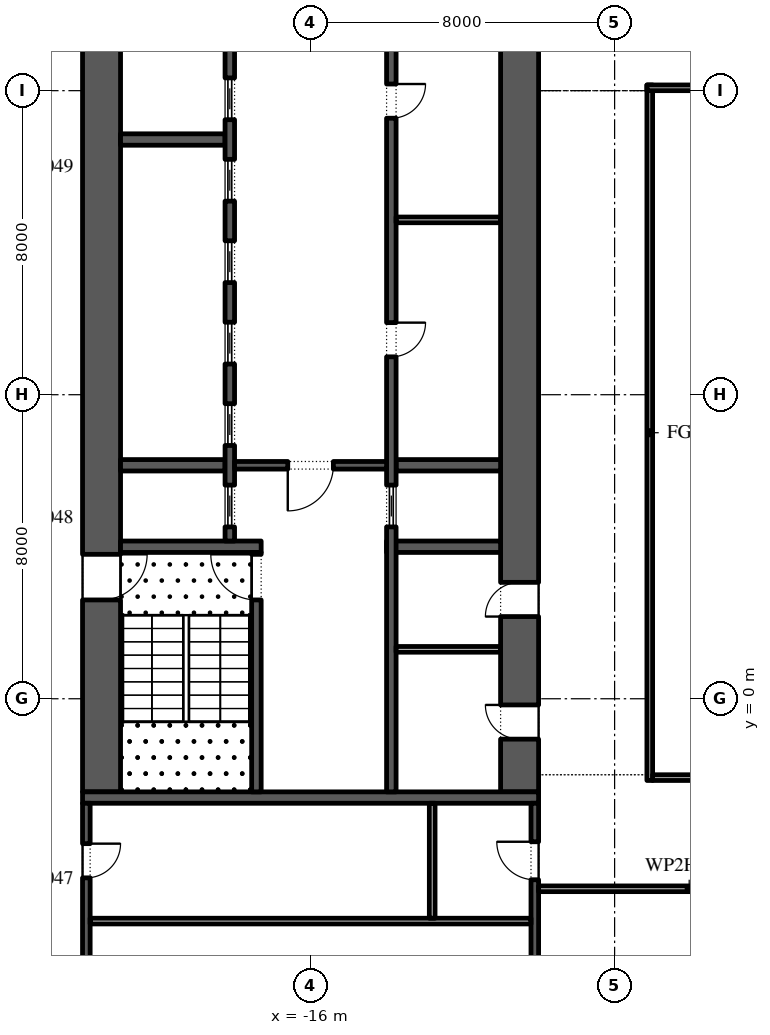
"""IFC4 building model, lengths in metres.
Left out: names, types, materials, properties, quantities, classifications, styles, units other than length and angle.
Written with IfcOpenShell. Run it as: python <this file> out.ifc"""

import sys

from ifc_helpers import new_model, si_unit, direction, frame, frame_2d, origin, place, context, subcontext, project, spatial, rectangle, extrude, element, fill, save


model = new_model("IFC4")
c1 = context("Model", 3, precision=1e-05, world=origin(), true_north=direction((0.0, 1.0)))
c2 = subcontext(c1, "Body", "Model", "MODEL_VIEW")
j1 = project(units=[si_unit("LENGTHUNIT", "METRE"), si_unit("PLANEANGLEUNIT", "RADIAN")], contexts=[c1])
p1 = place(None, origin())
s1 = spatial("IfcSite", under=j1, at=p1, CompositionType="ELEMENT")
p2 = place(p1, origin())
s2 = spatial("IfcBuilding", under=s1, at=p2, CompositionType="ELEMENT")
p3 = place(p2, frame((0.0, 0.0, 8.0)))
s3 = spatial("IfcBuildingStorey", under=s2, at=p3, CompositionType="ELEMENT", Elevation=8.0)
p4 = place(p3, frame((-7.075, -2.15, 0.0), z_axis=(0.0, 0.0, 1.0), x_axis=(0.0, 1.0, 0.0)))
e1 = element("IfcWall", 1, at=p4, inside=s3, PredefinedType="STANDARD", context=c2, shape_type="SweptSolid", body=[
    extrude(rectangle(XDim=18.3, YDim=0.15, at=frame_2d((9.15, 0.0))), origin(), (0.0, 0.0, 1.0), 5.7),
])
for number, where, z_axis, x_axis in (
    (2, (-7.15, 16.075, 0.0), (0.0, 0.0, 1.0), (1.0, 0.0, 0.0)),
    (3, (7.15, -2.075, 0.0), (0.0, 0.0, 1.0), (-1.0, 0.0, 0.0)),
):
    element("IfcWall", number, at=place(p3, frame(where, z_axis=z_axis, x_axis=x_axis)), inside=s3, PredefinedType="STANDARD", context=c2, shape_type="SweptSolid", body=[
        extrude(rectangle(XDim=14.15, YDim=0.15, at=frame_2d((7.075, 0.0))), origin(), (0.0, 0.0, 1.0), 4.72),
    ])
p5 = place(p3, frame((-21.5, -2.45, 0.0), z_axis=(0.0, 0.0, 1.0), x_axis=(0.0, 1.0, 0.0)))
e4 = element("IfcWall", 4, at=p5, inside=s3, PredefinedType="SHEAR", context=c2, shape_type="SweptSolid", body=[
    extrude(rectangle(XDim=27.9, YDim=1.0, at=frame_2d((13.95, 0.0))), origin(), (0.0, 0.0, 1.0), 5.7),
])
p6 = place(p5, frame((5.05, 0.0, 0.0)))
e5 = element("IfcOpeningElement", 5, at=p6, cuts=e4, PredefinedType="OPENING", context=c2, shape_type="SweptSolid", body=[
    extrude(rectangle(XDim=1.2, YDim=2.1, at=frame_2d((0.6, 1.05))), frame((0.0, 0.51, 0.0), z_axis=(0.0, -1.0, 0.0), x_axis=(1.0, 0.0, 0.0)), (0.0, 0.0, 1.0), 1.02),
])
p7 = place(p5, frame((21.65, 0.0, 0.0)))
e6 = element("IfcOpeningElement", 6, at=p7, cuts=e4, PredefinedType="OPENING", context=c2, shape_type="SweptSolid", body=[
    extrude(rectangle(XDim=1.2, YDim=2.1, at=frame_2d((0.6, 1.05))), frame((0.0, 0.51, 0.0), z_axis=(0.0, -1.0, 0.0), x_axis=(1.0, 0.0, 0.0)), (0.0, 0.0, 1.0), 1.02),
])
p8 = place(p3, frame((-10.5, -2.45, 0.0), z_axis=(0.0, 0.0, 1.0), x_axis=(0.0, 1.0, 0.0)))
e7 = element("IfcWall", 7, at=p8, inside=s3, PredefinedType="SHEAR", context=c2, shape_type="SweptSolid", body=[
    extrude(rectangle(XDim=27.9, YDim=1.0, at=frame_2d((13.95, 0.0))), origin(), (0.0, 0.0, 1.0), 5.7),
])
p9 = place(p8, frame((23.65, 0.0, 0.0)))
e8 = element("IfcOpeningElement", 8, at=p9, cuts=e7, PredefinedType="OPENING", context=c2, shape_type="SweptSolid", body=[
    extrude(rectangle(XDim=2.4, YDim=2.1, at=frame_2d((1.2, 1.05))), frame((0.0, 0.51, 0.0), z_axis=(0.0, -1.0, 0.0), x_axis=(1.0, 0.0, 0.0)), (0.0, 0.0, 1.0), 1.02),
])
p10 = place(p8, frame((1.387, 0.0, 0.0)))
e9 = element("IfcOpeningElement", 9, at=p10, cuts=e7, PredefinedType="OPENING", context=c2, shape_type="SweptSolid", body=[
    extrude(rectangle(XDim=0.9, YDim=2.1, at=frame_2d((0.45, 1.05))), frame((0.0, 0.51, 0.0), z_axis=(0.0, -1.0, 0.0), x_axis=(1.0, 0.0, 0.0)), (0.0, 0.0, 1.0), 1.02),
])
p11 = place(p8, frame((4.613, 0.0, 0.0)))
e10 = element("IfcOpeningElement", 10, at=p11, cuts=e7, PredefinedType="OPENING", context=c2, shape_type="SweptSolid", body=[
    extrude(rectangle(XDim=0.9, YDim=2.1, at=frame_2d((0.45, 1.05))), frame((0.0, 0.51, 0.0), z_axis=(0.0, -1.0, 0.0), x_axis=(1.0, 0.0, 0.0)), (0.0, 0.0, 1.0), 1.02),
])
p12 = place(p3, frame((-22.0, -2.6, 0.0), z_axis=(0.0, 0.0, 1.0), x_axis=(1.0, 0.0, 0.0)))
e11 = element("IfcWall", 11, at=p12, inside=s3, PredefinedType="SHEAR", context=c2, shape_type="SweptSolid", body=[
    extrude(rectangle(XDim=12.0, YDim=0.3, at=frame_2d((6.0, 0.0))), origin(), (0.0, 0.0, 1.0), 5.7),
])
p13 = place(p3, frame((-21.0, 4.0, 0.0), z_axis=(0.0, 0.0, 1.0), x_axis=(1.0, 0.0, 0.0)))
e12 = element("IfcWall", 12, at=p13, inside=s3, PredefinedType="SHEAR", context=c2, shape_type="SweptSolid", body=[
    extrude(rectangle(XDim=3.7, YDim=0.3, at=frame_2d((1.85, 0.0))), origin(), (0.0, 0.0, 1.0), 5.7),
])
p14 = place(p3, frame((-17.425, -2.45, 0.0), z_axis=(0.0, 0.0, 1.0), x_axis=(0.0, 1.0, 0.0)))
e13 = element("IfcWall", 13, at=p14, inside=s3, PredefinedType="SHEAR", context=c2, shape_type="SweptSolid", body=[
    extrude(rectangle(XDim=6.3, YDim=0.25, at=frame_2d((3.15, 0.0))), origin(), (0.0, 0.0, 1.0), 5.7),
])
p15 = place(p14, frame((5.05, 0.0, 0.0)))
e14 = element("IfcOpeningElement", 14, at=p15, cuts=e13, PredefinedType="OPENING", context=c2, shape_type="SweptSolid", body=[
    extrude(rectangle(XDim=1.2, YDim=2.1, at=frame_2d((0.6, 1.05))), frame((0.0, 0.135, 0.0), z_axis=(0.0, -1.0, 0.0), x_axis=(1.0, 0.0, 0.0)), (0.0, 0.0, 1.0), 0.27),
])
for number, where, z_axis, x_axis in (
    (15, (-21.0, 6.143, 0.0), (0.0, 0.0, 1.0), (1.0, 0.0, 0.0)),
    (16, (-21.0, 14.714, 0.0), (0.0, 0.0, 1.0), (1.0, 0.0, 0.0)),
):
    element("IfcWall", number, at=place(p3, frame(where, z_axis=z_axis, x_axis=x_axis)), inside=s3, PredefinedType="SHEAR", context=c2, shape_type="SweptSolid", body=[
        extrude(rectangle(XDim=2.75, YDim=0.3, at=frame_2d((1.375, 0.0))), origin(), (0.0, 0.0, 1.0), 5.7),
    ])
p16 = place(p3, frame((-18.125, 4.15, 0.0), z_axis=(0.0, 0.0, 1.0), x_axis=(0.0, 1.0, 0.0)))
e17 = element("IfcWall", 17, at=p16, inside=s3, PredefinedType="SHEAR", context=c2, shape_type="SweptSolid", body=[
    extrude(rectangle(XDim=14.7, YDim=0.25, at=frame_2d((7.35, 0.0))), origin(), (0.0, 0.0, 1.0), 5.7),
])
p17 = place(p16, frame((0.371, 0.0, 0.0)))
e18 = element("IfcOpeningElement", 18, at=p17, cuts=e17, PredefinedType="OPENING", context=c2, shape_type="SweptSolid", body=[
    extrude(rectangle(XDim=1.1, YDim=2.1, at=frame_2d((0.55, 1.05))), frame((0.0, 0.135, 0.0), z_axis=(0.0, -1.0, 0.0), x_axis=(1.0, 0.0, 0.0)), (0.0, 0.0, 1.0), 0.27),
])
p18 = place(p16, frame((2.514, 0.0, 0.0)))
e19 = element("IfcOpeningElement", 19, at=p18, cuts=e17, PredefinedType="OPENING", context=c2, shape_type="SweptSolid", body=[
    extrude(rectangle(XDim=1.1, YDim=2.1, at=frame_2d((0.55, 1.05))), frame((0.0, 0.135, 0.0), z_axis=(0.0, -1.0, 0.0), x_axis=(1.0, 0.0, 0.0)), (0.0, 0.0, 1.0), 0.27),
])
p19 = place(p16, frame((4.657, 0.0, 0.0)))
e20 = element("IfcOpeningElement", 20, at=p19, cuts=e17, PredefinedType="OPENING", context=c2, shape_type="SweptSolid", body=[
    extrude(rectangle(XDim=1.1, YDim=2.1, at=frame_2d((0.55, 1.05))), frame((0.0, 0.135, 0.0), z_axis=(0.0, -1.0, 0.0), x_axis=(1.0, 0.0, 0.0)), (0.0, 0.0, 1.0), 0.27),
])
p20 = place(p16, frame((6.8, 0.0, 0.0)))
e21 = element("IfcOpeningElement", 21, at=p20, cuts=e17, PredefinedType="OPENING", context=c2, shape_type="SweptSolid", body=[
    extrude(rectangle(XDim=1.1, YDim=2.1, at=frame_2d((0.55, 1.05))), frame((0.0, 0.135, 0.0), z_axis=(0.0, -1.0, 0.0), x_axis=(1.0, 0.0, 0.0)), (0.0, 0.0, 1.0), 0.27),
])
p21 = place(p16, frame((8.943, 0.0, 0.0)))
e22 = element("IfcOpeningElement", 22, at=p21, cuts=e17, PredefinedType="OPENING", context=c2, shape_type="SweptSolid", body=[
    extrude(rectangle(XDim=1.1, YDim=2.1, at=frame_2d((0.55, 1.05))), frame((0.0, 0.135, 0.0), z_axis=(0.0, -1.0, 0.0), x_axis=(1.0, 0.0, 0.0)), (0.0, 0.0, 1.0), 0.27),
])
p22 = place(p16, frame((11.086, 0.0, 0.0)))
e23 = element("IfcOpeningElement", 23, at=p22, cuts=e17, PredefinedType="OPENING", context=c2, shape_type="SweptSolid", body=[
    extrude(rectangle(XDim=1.1, YDim=2.1, at=frame_2d((0.55, 1.05))), frame((0.0, 0.135, 0.0), z_axis=(0.0, -1.0, 0.0), x_axis=(1.0, 0.0, 0.0)), (0.0, 0.0, 1.0), 0.27),
])
p23 = place(p16, frame((13.229, 0.0, 0.0)))
e24 = element("IfcOpeningElement", 24, at=p23, cuts=e17, PredefinedType="OPENING", context=c2, shape_type="SweptSolid", body=[
    extrude(rectangle(XDim=1.1, YDim=2.1, at=frame_2d((0.55, 1.05))), frame((0.0, 0.135, 0.0), z_axis=(0.0, -1.0, 0.0), x_axis=(1.0, 0.0, 0.0)), (0.0, 0.0, 1.0), 0.27),
])
p24 = place(p3, frame((-14.0, 4.0, 0.0), z_axis=(0.0, 0.0, 1.0), x_axis=(1.0, 0.0, 0.0)))
e25 = element("IfcWall", 25, at=p24, inside=s3, PredefinedType="SHEAR", context=c2, shape_type="SweptSolid", body=[
    extrude(rectangle(XDim=3.0, YDim=0.3, at=frame_2d((1.5, 0.0))), origin(), (0.0, 0.0, 1.0), 5.7),
])
p25 = place(p3, frame((-13.75, 6.143, 0.0), z_axis=(0.0, 0.0, 1.0), x_axis=(1.0, 0.0, 0.0)))
e26 = element("IfcWall", 26, at=p25, inside=s3, PredefinedType="SHEAR", context=c2, shape_type="SweptSolid", body=[
    extrude(rectangle(XDim=2.75, YDim=0.3, at=frame_2d((1.375, 0.0))), origin(), (0.0, 0.0, 1.0), 5.7),
])
p26 = place(p3, frame((-13.875, -2.45, 0.0), z_axis=(0.0, 0.0, 1.0), x_axis=(0.0, 1.0, 0.0)))
e27 = element("IfcWall", 27, at=p26, inside=s3, PredefinedType="SHEAR", context=c2, shape_type="SweptSolid", body=[
    extrude(rectangle(XDim=21.3, YDim=0.25, at=frame_2d((10.65, 0.0))), origin(), (0.0, 0.0, 1.0), 5.7),
])
p27 = place(p26, frame((11.446, 0.0, 0.0)))
e28 = element("IfcOpeningElement", 28, at=p27, cuts=e27, PredefinedType="OPENING", context=c2, shape_type="SweptSolid", body=[
    extrude(rectangle(XDim=0.9, YDim=2.1, at=frame_2d((0.45, 1.05))), frame((0.0, 0.135, 0.0), z_axis=(0.0, -1.0, 0.0), x_axis=(1.0, 0.0, 0.0)), (0.0, 0.0, 1.0), 0.27),
])
p28 = place(p26, frame((17.725, 0.0, 0.0)))
e29 = element("IfcOpeningElement", 29, at=p28, cuts=e27, PredefinedType="OPENING", context=c2, shape_type="SweptSolid", body=[
    extrude(rectangle(XDim=0.9, YDim=2.1, at=frame_2d((0.45, 1.05))), frame((0.0, 0.135, 0.0), z_axis=(0.0, -1.0, 0.0), x_axis=(1.0, 0.0, 0.0)), (0.0, 0.0, 1.0), 0.27),
])
p29 = place(p26, frame((6.971, 0.0, 0.0)))
e30 = element("IfcOpeningElement", 30, at=p29, cuts=e27, PredefinedType="OPENING", context=c2, shape_type="SweptSolid", body=[
    extrude(rectangle(XDim=1.1, YDim=2.1, at=frame_2d((0.55, 1.05))), frame((0.0, 0.135, 0.0), z_axis=(0.0, -1.0, 0.0), x_axis=(1.0, 0.0, 0.0)), (0.0, 0.0, 1.0), 0.27),
])
p30 = place(p3, frame((-13.75, 12.6, 0.0), z_axis=(0.0, 0.0, 1.0), x_axis=(1.0, 0.0, 0.0)))
e31 = element("IfcWall", 31, at=p30, inside=s3, PredefinedType="PARTITIONING", context=c2, shape_type="SweptSolid", body=[
    extrude(rectangle(XDim=2.75, YDim=0.15, at=frame_2d((1.375, 0.0))), origin(), (0.0, 0.0, 1.0), 5.7),
])
p31 = place(p3, frame((-18.0, 6.143, 0.0), z_axis=(0.0, 0.0, 1.0), x_axis=(1.0, 0.0, 0.0)))
e32 = element("IfcWall", 32, at=p31, inside=s3, PredefinedType="SHEAR", context=c2, shape_type="SweptSolid", body=[
    extrude(rectangle(XDim=4.0, YDim=0.2, at=frame_2d((2.0, 0.0))), origin(), (0.0, 0.0, 1.0), 5.7),
])
p32 = place(p31, frame((1.4, 0.0, 0.0)))
e33 = element("IfcOpeningElement", 33, at=p32, cuts=e32, PredefinedType="OPENING", context=c2, shape_type="SweptSolid", body=[
    extrude(rectangle(XDim=1.2, YDim=2.1, at=frame_2d((0.6, 1.05))), frame((0.0, 0.11, 0.0), z_axis=(0.0, -1.0, 0.0), x_axis=(1.0, 0.0, 0.0)), (0.0, 0.0, 1.0), 0.22),
])
p33 = place(p3, frame((-13.75, 1.3, 0.0), z_axis=(0.0, 0.0, 1.0), x_axis=(1.0, 0.0, 0.0)))
e34 = element("IfcWall", 34, at=p33, inside=s3, PredefinedType="PARTITIONING", context=c2, shape_type="SweptSolid", body=[
    extrude(rectangle(XDim=2.75, YDim=0.15, at=frame_2d((1.375, 0.0))), origin(), (0.0, 0.0, 1.0), 5.7),
])
p34 = place(p3, frame((-21.9, -15.8, 0.0), z_axis=(0.0, 0.0, 1.0), x_axis=(0.0, 1.0, 0.0)))
e35 = element("IfcWall", 35, at=p34, inside=s3, PredefinedType="SHEAR", context=c2, shape_type="SweptSolid", body=[
    extrude(rectangle(XDim=13.05, YDim=0.2, at=frame_2d((6.525, 0.0))), origin(), (0.0, 0.0, 1.0), 5.7),
])
p35 = place(p34, frame((11.087, 0.0, 0.0)))
e36 = element("IfcOpeningElement", 36, at=p35, cuts=e35, PredefinedType="OPENING", context=c2, shape_type="SweptSolid", body=[
    extrude(rectangle(XDim=0.9, YDim=2.1, at=frame_2d((0.45, 1.05))), frame((0.0, 0.11, 0.0), z_axis=(0.0, -1.0, 0.0), x_axis=(1.0, 0.0, 0.0)), (0.0, 0.0, 1.0), 0.22),
])
p36 = place(p3, frame((-10.1, -15.8, 0.0), z_axis=(0.0, 0.0, 1.0), x_axis=(0.0, 1.0, 0.0)))
e37 = element("IfcWall", 37, at=p36, inside=s3, PredefinedType="SHEAR", context=c2, shape_type="SweptSolid", body=[
    extrude(rectangle(XDim=13.05, YDim=0.2, at=frame_2d((6.525, 0.0))), origin(), (0.0, 0.0, 1.0), 5.7),
])
p37 = place(p36, frame((4.488, 0.0, 0.0)))
e38 = element("IfcOpeningElement", 38, at=p37, cuts=e37, PredefinedType="OPENING", context=c2, shape_type="SweptSolid", body=[
    extrude(rectangle(XDim=0.9, YDim=2.1, at=frame_2d((0.45, 1.05))), frame((0.0, 0.11, 0.0), z_axis=(0.0, -1.0, 0.0), x_axis=(1.0, 0.0, 0.0)), (0.0, 0.0, 1.0), 0.22),
])
p38 = place(p36, frame((11.038, 0.0, 0.0)))
e39 = element("IfcOpeningElement", 39, at=p38, cuts=e37, PredefinedType="OPENING", context=c2, shape_type="SweptSolid", body=[
    extrude(rectangle(XDim=1.0, YDim=2.1, at=frame_2d((0.5, 1.05))), frame((0.0, 0.11, 0.0), z_axis=(0.0, -1.0, 0.0), x_axis=(1.0, 0.0, 0.0)), (0.0, 0.0, 1.0), 0.22),
])
p39 = place(p3, frame((-21.8, -5.85, 0.0), z_axis=(0.0, 0.0, 1.0), x_axis=(1.0, 0.0, 0.0)))
e40 = element("IfcWall", 40, at=p39, inside=s3, PredefinedType="PARTITIONING", context=c2, shape_type="SweptSolid", body=[
    extrude(rectangle(XDim=11.6, YDim=0.15, at=frame_2d((5.8, 0.0))), origin(), (0.0, 0.0, 1.0), 5.7),
])
p40 = place(p3, frame((-12.8, -5.775, 0.0), z_axis=(0.0, 0.0, 1.0), x_axis=(0.0, 1.0, 0.0)))
e41 = element("IfcWall", 41, at=p40, inside=s3, PredefinedType="PARTITIONING", context=c2, shape_type="SweptSolid", body=[
    extrude(rectangle(XDim=3.025, YDim=0.15, at=frame_2d((1.512, 0.0))), origin(), (0.0, 0.0, 1.0), 5.7),
])
p41 = place(p3, frame((-10.0, -5.0, 0.0), z_axis=(0.0, 0.0, 1.0), x_axis=(1.0, 0.0, 0.0)))
e42 = element("IfcWall", 42, at=p41, inside=s3, PredefinedType="PARTITIONING", context=c2, shape_type="SweptSolid", body=[
    extrude(rectangle(XDim=7.925, YDim=0.15, at=frame_2d((3.962, 0.0))), origin(), (0.0, 0.0, 1.0), 5.7),
])
p42 = place(p17, origin())
e43 = element("IfcDoor", 43, at=p42, inside=s3, OperationType="SLIDING_TO_LEFT", PredefinedType="DOOR", context=c2, shape_type="SweptSolid", body=[
    extrude(rectangle(XDim=1.1, YDim=2.1, at=frame_2d((0.55, 1.05))), frame((0.0, 0.025, 0.0), z_axis=(0.0, -1.0, 0.0), x_axis=(1.0, 0.0, 0.0)), (0.0, 0.0, 1.0), 0.05),
])
fill(e18, e43)
p43 = place(p18, origin())
e44 = element("IfcDoor", 44, at=p43, inside=s3, OperationType="SLIDING_TO_LEFT", PredefinedType="DOOR", context=c2, shape_type="SweptSolid", body=[
    extrude(rectangle(XDim=1.1, YDim=2.1, at=frame_2d((0.55, 1.05))), frame((0.0, 0.025, 0.0), z_axis=(0.0, -1.0, 0.0), x_axis=(1.0, 0.0, 0.0)), (0.0, 0.0, 1.0), 0.05),
])
fill(e19, e44)
p44 = place(p19, origin())
e45 = element("IfcDoor", 45, at=p44, inside=s3, OperationType="SLIDING_TO_LEFT", PredefinedType="DOOR", context=c2, shape_type="SweptSolid", body=[
    extrude(rectangle(XDim=1.1, YDim=2.1, at=frame_2d((0.55, 1.05))), frame((0.0, 0.025, 0.0), z_axis=(0.0, -1.0, 0.0), x_axis=(1.0, 0.0, 0.0)), (0.0, 0.0, 1.0), 0.05),
])
fill(e20, e45)
p45 = place(p20, origin())
e46 = element("IfcDoor", 46, at=p45, inside=s3, OperationType="SLIDING_TO_LEFT", PredefinedType="DOOR", context=c2, shape_type="SweptSolid", body=[
    extrude(rectangle(XDim=1.1, YDim=2.1, at=frame_2d((0.55, 1.05))), frame((0.0, 0.025, 0.0), z_axis=(0.0, -1.0, 0.0), x_axis=(1.0, 0.0, 0.0)), (0.0, 0.0, 1.0), 0.05),
])
fill(e21, e46)
p46 = place(p21, origin())
e47 = element("IfcDoor", 47, at=p46, inside=s3, OperationType="SLIDING_TO_LEFT", PredefinedType="DOOR", context=c2, shape_type="SweptSolid", body=[
    extrude(rectangle(XDim=1.1, YDim=2.1, at=frame_2d((0.55, 1.05))), frame((0.0, 0.025, 0.0), z_axis=(0.0, -1.0, 0.0), x_axis=(1.0, 0.0, 0.0)), (0.0, 0.0, 1.0), 0.05),
])
fill(e22, e47)
p47 = place(p22, origin())
e48 = element("IfcDoor", 48, at=p47, inside=s3, OperationType="SLIDING_TO_LEFT", PredefinedType="DOOR", context=c2, shape_type="SweptSolid", body=[
    extrude(rectangle(XDim=1.1, YDim=2.1, at=frame_2d((0.55, 1.05))), frame((0.0, 0.025, 0.0), z_axis=(0.0, -1.0, 0.0), x_axis=(1.0, 0.0, 0.0)), (0.0, 0.0, 1.0), 0.05),
])
fill(e23, e48)
p48 = place(p27, frame((0.9, -0.2, 0.0), z_axis=(0.0, 0.0, 1.0), x_axis=(-1.0, 0.0, 0.0)))
e49 = element("IfcDoor", 49, at=p48, inside=s3, OperationType="SINGLE_SWING_RIGHT", PredefinedType="DOOR", context=c2, shape_type="SweptSolid", body=[
    extrude(rectangle(XDim=0.9, YDim=2.1, at=frame_2d((0.45, 1.05))), frame((0.0, -0.075, 0.0), z_axis=(0.0, -1.0, 0.0), x_axis=(1.0, 0.0, 0.0)), (0.0, 0.0, 1.0), 0.05),
])
fill(e28, e49)
p49 = place(p28, frame((0.9, -0.2, 0.0), z_axis=(0.0, 0.0, 1.0), x_axis=(-1.0, 0.0, 0.0)))
e50 = element("IfcDoor", 50, at=p49, inside=s3, OperationType="SINGLE_SWING_RIGHT", PredefinedType="DOOR", context=c2, shape_type="SweptSolid", body=[
    extrude(rectangle(XDim=0.9, YDim=2.1, at=frame_2d((0.45, 1.05))), frame((0.0, -0.075, 0.0), z_axis=(0.0, -1.0, 0.0), x_axis=(1.0, 0.0, 0.0)), (0.0, 0.0, 1.0), 0.05),
])
fill(e29, e50)
p50 = place(p29, origin())
e51 = element("IfcDoor", 51, at=p50, inside=s3, OperationType="SLIDING_TO_LEFT", PredefinedType="DOOR", context=c2, shape_type="SweptSolid", body=[
    extrude(rectangle(XDim=1.1, YDim=2.1, at=frame_2d((0.55, 1.05))), frame((0.0, 0.025, 0.0), z_axis=(0.0, -1.0, 0.0), x_axis=(1.0, 0.0, 0.0)), (0.0, 0.0, 1.0), 0.05),
])
fill(e30, e51)
p51 = place(p32, frame((1.2, 0.0, 0.0), z_axis=(0.0, 0.0, 1.0), x_axis=(-1.0, 0.0, 0.0)))
e52 = element("IfcDoor", 52, at=p51, inside=s3, OperationType="SINGLE_SWING_LEFT", PredefinedType="DOOR", context=c2, shape_type="SweptSolid", body=[
    extrude(rectangle(XDim=1.2, YDim=2.1, at=frame_2d((0.6, 1.05))), frame((0.0, 0.025, 0.0), z_axis=(0.0, -1.0, 0.0), x_axis=(1.0, 0.0, 0.0)), (0.0, 0.0, 1.0), 0.05),
])
fill(e33, e52)
p52 = place(p15, origin())
e53 = element("IfcDoor", 53, at=p52, inside=s3, OperationType="SINGLE_SWING_LEFT", PredefinedType="DOOR", context=c2, shape_type="SweptSolid", body=[
    extrude(rectangle(XDim=1.2, YDim=2.1, at=frame_2d((0.6, 1.05))), frame((0.0, 0.025, 0.0), z_axis=(0.0, -1.0, 0.0), x_axis=(1.0, 0.0, 0.0)), (0.0, 0.0, 1.0), 0.05),
])
fill(e14, e53)
p53 = place(p6, frame((1.2, 0.0, 0.0), z_axis=(0.0, 0.0, 1.0), x_axis=(-1.0, 0.0, 0.0)))
e54 = element("IfcDoor", 54, at=p53, inside=s3, OperationType="SINGLE_SWING_RIGHT", PredefinedType="DOOR", context=c2, shape_type="SweptSolid", body=[
    extrude(rectangle(XDim=1.2, YDim=2.1, at=frame_2d((0.6, 1.05))), frame((0.0, 0.025, 0.0), z_axis=(0.0, -1.0, 0.0), x_axis=(1.0, 0.0, 0.0)), (0.0, 0.0, 1.0), 0.05),
])
fill(e5, e54)
p54 = place(p10, origin())
e55 = element("IfcDoor", 55, at=p54, inside=s3, OperationType="SINGLE_SWING_LEFT", PredefinedType="DOOR", context=c2, shape_type="SweptSolid", body=[
    extrude(rectangle(XDim=0.9, YDim=2.1, at=frame_2d((0.45, 1.05))), frame((0.0, 0.5, 0.0), z_axis=(0.0, -1.0, 0.0), x_axis=(1.0, 0.0, 0.0)), (0.0, 0.0, 1.0), 0.05),
])
fill(e9, e55)
p55 = place(p11, origin())
e56 = element("IfcDoor", 56, at=p55, inside=s3, OperationType="SINGLE_SWING_RIGHT", PredefinedType="DOOR", context=c2, shape_type="SweptSolid", body=[
    extrude(rectangle(XDim=0.9, YDim=2.1, at=frame_2d((0.45, 1.05))), frame((0.0, 0.5, 0.0), z_axis=(0.0, -1.0, 0.0), x_axis=(1.0, 0.0, 0.0)), (0.0, 0.0, 1.0), 0.05),
])
fill(e10, e56)
p56 = place(p38, origin())
e57 = element("IfcDoor", 57, at=p56, inside=s3, OperationType="SINGLE_SWING_LEFT", PredefinedType="DOOR", context=c2, shape_type="SweptSolid", body=[
    extrude(rectangle(XDim=1.0, YDim=2.1, at=frame_2d((0.5, 1.05))), frame((0.0, 0.1, 0.0), z_axis=(0.0, -1.0, 0.0), x_axis=(1.0, 0.0, 0.0)), (0.0, 0.0, 1.0), 0.05),
])
fill(e39, e57)
p57 = place(p35, frame((0.9, -0.15, 0.0), z_axis=(0.0, 0.0, 1.0), x_axis=(-1.0, 0.0, 0.0)))
e58 = element("IfcDoor", 58, at=p57, inside=s3, OperationType="SINGLE_SWING_RIGHT", PredefinedType="DOOR", context=c2, shape_type="SweptSolid", body=[
    extrude(rectangle(XDim=0.9, YDim=2.1, at=frame_2d((0.45, 1.05))), frame((0.0, -0.05, 0.0), z_axis=(0.0, -1.0, 0.0), x_axis=(1.0, 0.0, 0.0)), (0.0, 0.0, 1.0), 0.05),
])
fill(e36, e58)
save(model, sys.argv[1])
